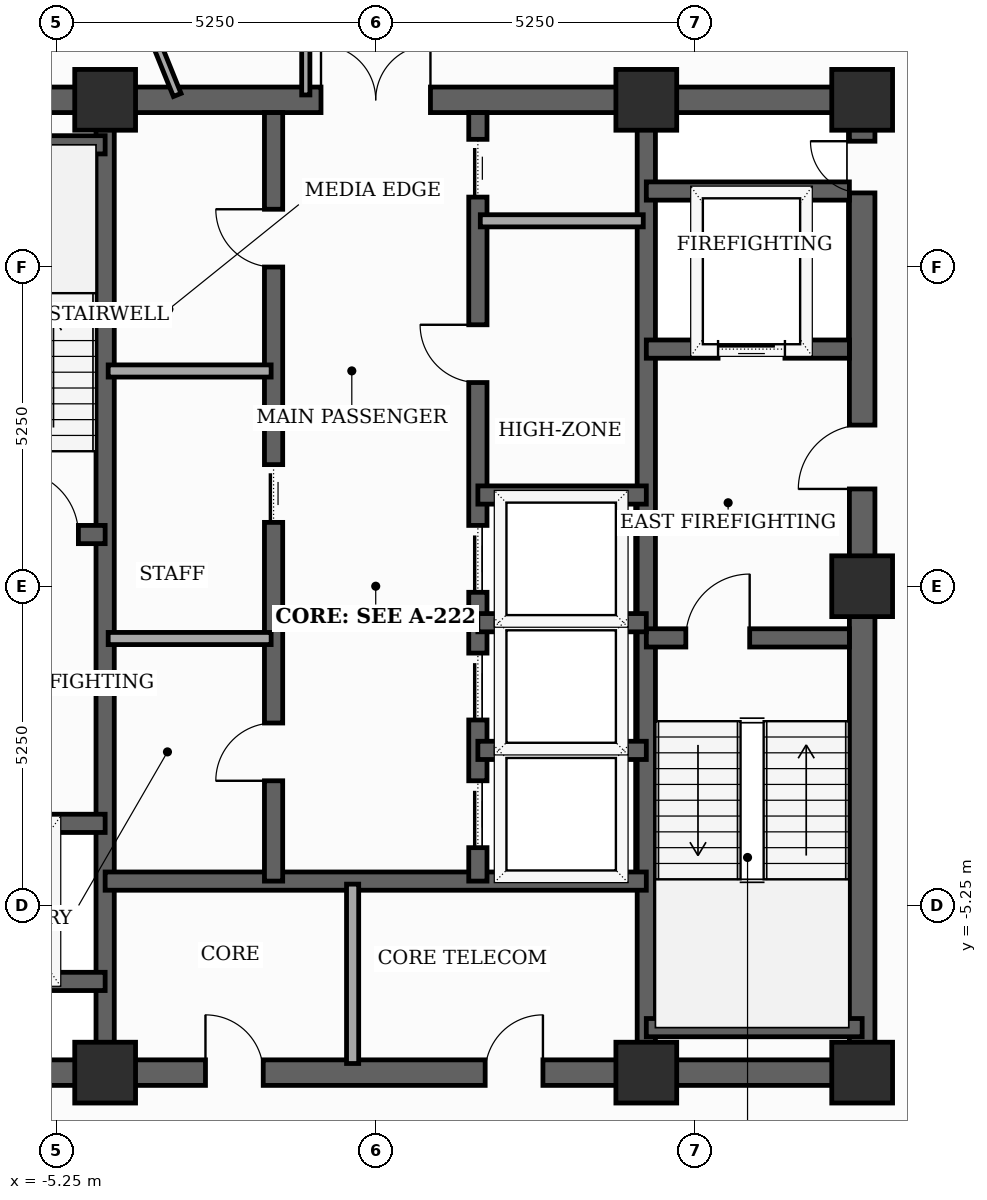
"""IFC4 building model, lengths in metres.
Left out: names, types, materials, properties, quantities, classifications, styles, units other than length and angle.
Written with IfcOpenShell. Run it as: python <this file> out.ifc"""

import sys

from ifc_helpers import new_model, si_unit, direction, frame, frame_2d, origin, origin_2d, place, context, subcontext, project, spatial, rectangle, extrude, element, fill, save


model = new_model("IFC4")
c1 = context("Model", 3, precision=1e-05, world=origin(), true_north=direction((0.0, 1.0)))
c2 = subcontext(c1, "Body", "Model", "MODEL_VIEW")
j1 = project(units=[si_unit("LENGTHUNIT", "METRE"), si_unit("PLANEANGLEUNIT", "RADIAN")], contexts=[c1])
p1 = place(None, origin())
s1 = spatial("IfcSite", under=j1, at=p1, CompositionType="ELEMENT")
p2 = place(p1, origin())
s2 = spatial("IfcBuilding", under=s1, at=p2, CompositionType="ELEMENT")
p3 = place(p2, frame((0.0, 0.0, 259.6)))
s3 = spatial("IfcBuildingStorey", under=s2, at=p3, CompositionType="ELEMENT", Elevation=259.6)
for number, where, z_axis, x_axis in (
    (1, (-4.45, -8.0, 0.0), (0.0, 0.0, 1.0), (1.0, 0.0, 0.0)),
    (2, (4.45, -8.0, 0.0), (0.0, 0.0, 1.0), (1.0, 0.0, 0.0)),
    (3, (8.0, -8.0, 0.0), (0.0, 0.0, 1.0), (1.0, 0.0, 0.0)),
    (4, (8.0, 0.0, 0.0), (0.0, 0.0, 1.0), (1.0, 0.0, 0.0)),
    (5, (8.0, 8.0, 0.0), (0.0, 0.0, 1.0), (1.0, 0.0, 0.0)),
    (6, (4.45, 8.0, 0.0), (0.0, 0.0, 1.0), (1.0, 0.0, 0.0)),
    (7, (-4.45, 8.0, 0.0), (0.0, 0.0, 1.0), (1.0, 0.0, 0.0)),
):
    element("IfcColumn", number, at=place(p3, frame(where, z_axis=z_axis, x_axis=x_axis)), inside=s3, PredefinedType="COLUMN", context=c2, shape_type="SweptSolid", body=[
        extrude(rectangle(XDim=1.0, YDim=1.0, at=origin_2d()), origin(), (0.0, 0.0, 1.0), 3.7),
    ])
p4 = place(p3, frame((8.0, -8.0, 0.0), z_axis=(0.0, 0.0, 1.0), x_axis=(0.0, 1.0, 0.0)))
e8 = element("IfcWall", 8, at=p4, inside=s3, PredefinedType="SHEAR", context=c2, shape_type="SweptSolid", body=[
    extrude(rectangle(XDim=16.0, YDim=0.42, at=frame_2d((8.0, 0.0))), origin(), (0.0, 0.0, 1.0), 3.5),
])
p5 = place(p4, frame((9.6, 0.0, 0.0)))
e9 = element("IfcOpeningElement", 9, at=p5, cuts=e8, PredefinedType="OPENING", context=c2, shape_type="SweptSolid", body=[
    extrude(rectangle(XDim=1.05, YDim=2.15, at=frame_2d((0.525, 1.075))), frame((0.0, 0.22, 0.0), z_axis=(0.0, -1.0, 0.0), x_axis=(1.0, 0.0, 0.0)), (0.0, 0.0, 1.0), 0.44),
])
p6 = place(p4, frame((14.469, 0.0, 0.0)))
e10 = element("IfcOpeningElement", 10, at=p6, cuts=e8, PredefinedType="OPENING", context=c2, shape_type="SweptSolid", body=[
    extrude(rectangle(XDim=0.85, YDim=2.02, at=frame_2d((0.425, 1.01))), frame((0.0, 0.22, 0.0), z_axis=(0.0, -1.0, 0.0), x_axis=(1.0, 0.0, 0.0)), (0.0, 0.0, 1.0), 0.44),
])
p7 = place(p3, frame((-8.0, -8.0, 0.0), z_axis=(0.0, 0.0, 1.0), x_axis=(1.0, 0.0, 0.0)))
e11 = element("IfcWall", 11, at=p7, inside=s3, PredefinedType="SHEAR", context=c2, shape_type="SweptSolid", body=[
    extrude(rectangle(XDim=16.0, YDim=0.42, at=frame_2d((8.0, 0.0))), origin(), (0.0, 0.0, 1.0), 3.5),
])
p8 = place(p7, frame((5.2, 0.0, 0.0)))
e12 = element("IfcOpeningElement", 12, at=p8, cuts=e11, PredefinedType="OPENING", context=c2, shape_type="SweptSolid", body=[
    extrude(rectangle(XDim=0.95, YDim=2.1, at=frame_2d((0.475, 1.05))), frame((0.0, 0.22, 0.0), z_axis=(0.0, -1.0, 0.0), x_axis=(1.0, 0.0, 0.0)), (0.0, 0.0, 1.0), 0.44),
])
p9 = place(p7, frame((9.8, 0.0, 0.0)))
e13 = element("IfcOpeningElement", 13, at=p9, cuts=e11, PredefinedType="OPENING", context=c2, shape_type="SweptSolid", body=[
    extrude(rectangle(XDim=0.95, YDim=2.1, at=frame_2d((0.475, 1.05))), frame((0.0, 0.22, 0.0), z_axis=(0.0, -1.0, 0.0), x_axis=(1.0, 0.0, 0.0)), (0.0, 0.0, 1.0), 0.44),
])
p10 = place(p3, frame((-8.0, 8.0, 0.0), z_axis=(0.0, 0.0, 1.0), x_axis=(1.0, 0.0, 0.0)))
e14 = element("IfcWall", 14, at=p10, inside=s3, PredefinedType="SHEAR", context=c2, shape_type="SweptSolid", body=[
    extrude(rectangle(XDim=16.0, YDim=0.42, at=frame_2d((8.0, 0.0))), origin(), (0.0, 0.0, 1.0), 3.5),
])
p11 = place(p10, frame((7.1, 0.0, 0.0)))
e15 = element("IfcOpeningElement", 15, at=p11, cuts=e14, PredefinedType="OPENING", context=c2, shape_type="SweptSolid", body=[
    extrude(rectangle(XDim=1.8, YDim=2.15, at=frame_2d((0.9, 1.075))), frame((0.0, 0.22, 0.0), z_axis=(0.0, -1.0, 0.0), x_axis=(1.0, 0.0, 0.0)), (0.0, 0.0, 1.0), 0.44),
])
for number, where, z_axis, x_axis in (
    (16, (-4.45, -7.79, 0.0), (0.0, 0.0, 1.0), (0.0, 1.0, 0.0)),
    (17, (4.45, -7.79, 0.0), (0.0, 0.0, 1.0), (0.0, 1.0, 0.0)),
):
    element("IfcWall", number, at=place(p3, frame(where, z_axis=z_axis, x_axis=x_axis)), inside=s3, PredefinedType="SHEAR", context=c2, shape_type="SweptSolid", body=[
        extrude(rectangle(XDim=15.58, YDim=0.3, at=frame_2d((7.79, 0.0))), origin(), (0.0, 0.0, 1.0), 3.5),
    ])
p12 = place(p3, frame((-7.79, 0.85, 0.0), z_axis=(0.0, 0.0, 1.0), x_axis=(1.0, 0.0, 0.0)))
e18 = element("IfcWall", 18, at=p12, inside=s3, PredefinedType="SHEAR", context=c2, shape_type="SweptSolid", body=[
    extrude(rectangle(XDim=3.34, YDim=0.3, at=frame_2d((1.67, 0.0))), origin(), (0.0, 0.0, 1.0), 3.5),
])
p13 = place(p12, frame((1.85, 0.0, 0.0)))
e19 = element("IfcOpeningElement", 19, at=p13, cuts=e18, PredefinedType="OPENING", context=c2, shape_type="SweptSolid", body=[
    extrude(rectangle(XDim=1.05, YDim=2.15, at=frame_2d((0.525, 1.075))), frame((0.0, 0.16, 0.0), z_axis=(0.0, -1.0, 0.0), x_axis=(1.0, 0.0, 0.0)), (0.0, 0.0, 1.0), 0.32),
])
p14 = place(p3, frame((-7.79, 7.26, 0.0), z_axis=(0.0, 0.0, 1.0), x_axis=(1.0, 0.0, 0.0)))
e20 = element("IfcWall", 20, at=p14, inside=s3, PredefinedType="SHEAR", context=c2, shape_type="SweptSolid", body=[
    extrude(rectangle(XDim=3.34, YDim=0.3, at=frame_2d((1.67, 0.0))), origin(), (0.0, 0.0, 1.0), 3.5),
])
p15 = place(p3, frame((4.45, -0.85, 0.0), z_axis=(0.0, 0.0, 1.0), x_axis=(1.0, 0.0, 0.0)))
e21 = element("IfcWall", 21, at=p15, inside=s3, PredefinedType="SHEAR", context=c2, shape_type="SweptSolid", body=[
    extrude(rectangle(XDim=3.34, YDim=0.3, at=frame_2d((1.67, 0.0))), origin(), (0.0, 0.0, 1.0), 3.5),
])
p16 = place(p15, frame((0.65, 0.0, 0.0)))
e22 = element("IfcOpeningElement", 22, at=p16, cuts=e21, PredefinedType="OPENING", context=c2, shape_type="SweptSolid", body=[
    extrude(rectangle(XDim=1.05, YDim=2.15, at=frame_2d((0.525, 1.075))), frame((0.0, 0.16, 0.0), z_axis=(0.0, -1.0, 0.0), x_axis=(1.0, 0.0, 0.0)), (0.0, 0.0, 1.0), 0.32),
])
p17 = place(p3, frame((4.45, -7.26, 0.0), z_axis=(0.0, 0.0, 1.0), x_axis=(1.0, 0.0, 0.0)))
e23 = element("IfcWall", 23, at=p17, inside=s3, PredefinedType="SHEAR", context=c2, shape_type="SweptSolid", body=[
    extrude(rectangle(XDim=3.55, YDim=0.3, at=frame_2d((1.775, 0.0))), origin(), (0.0, 0.0, 1.0), 3.5),
])
p18 = place(p3, frame((-7.79, -3.9, 0.0), z_axis=(0.0, 0.0, 1.0), x_axis=(1.0, 0.0, 0.0)))
e24 = element("IfcWall", 24, at=p18, inside=s3, PredefinedType="SHEAR", context=c2, shape_type="SweptSolid", body=[
    extrude(rectangle(XDim=3.34, YDim=0.3, at=frame_2d((1.67, 0.0))), origin(), (0.0, 0.0, 1.0), 3.5),
])
p19 = place(p18, frame((1.27, 0.0, 0.0)))
e25 = element("IfcOpeningElement", 25, at=p19, cuts=e24, PredefinedType="OPENING", context=c2, shape_type="SweptSolid", body=[
    extrude(rectangle(XDim=1.1, YDim=2.1, at=frame_2d((0.55, 1.05))), frame((0.0, 0.16, 0.0), z_axis=(0.0, -1.0, 0.0), x_axis=(1.0, 0.0, 0.0)), (0.0, 0.0, 1.0), 0.32),
])
p20 = place(p3, frame((-7.79, -6.5, 0.0), z_axis=(0.0, 0.0, 1.0), x_axis=(1.0, 0.0, 0.0)))
e26 = element("IfcWall", 26, at=p20, inside=s3, PredefinedType="SHEAR", context=c2, shape_type="SweptSolid", body=[
    extrude(rectangle(XDim=3.34, YDim=0.3, at=frame_2d((1.67, 0.0))), origin(), (0.0, 0.0, 1.0), 3.5),
])
p21 = place(p3, frame((4.45, 3.9, 0.0), z_axis=(0.0, 0.0, 1.0), x_axis=(1.0, 0.0, 0.0)))
e27 = element("IfcWall", 27, at=p21, inside=s3, PredefinedType="SHEAR", context=c2, shape_type="SweptSolid", body=[
    extrude(rectangle(XDim=3.34, YDim=0.3, at=frame_2d((1.67, 0.0))), origin(), (0.0, 0.0, 1.0), 3.5),
])
p22 = place(p21, frame((1.18, 0.0, 0.0)))
e28 = element("IfcOpeningElement", 28, at=p22, cuts=e27, PredefinedType="OPENING", context=c2, shape_type="SweptSolid", body=[
    extrude(rectangle(XDim=1.1, YDim=2.1, at=frame_2d((0.55, 1.05))), frame((0.0, 0.16, 0.0), z_axis=(0.0, -1.0, 0.0), x_axis=(1.0, 0.0, 0.0)), (0.0, 0.0, 1.0), 0.32),
])
p23 = place(p3, frame((4.45, 6.5, 0.0), z_axis=(0.0, 0.0, 1.0), x_axis=(1.0, 0.0, 0.0)))
e29 = element("IfcWall", 29, at=p23, inside=s3, PredefinedType="SHEAR", context=c2, shape_type="SweptSolid", body=[
    extrude(rectangle(XDim=3.34, YDim=0.3, at=frame_2d((1.67, 0.0))), origin(), (0.0, 0.0, 1.0), 3.5),
])
p24 = place(p3, frame((-4.45, -4.85, 0.0), z_axis=(0.0, 0.0, 1.0), x_axis=(1.0, 0.0, 0.0)))
e30 = element("IfcWall", 30, at=p24, inside=s3, PredefinedType="SHEAR", context=c2, shape_type="SweptSolid", body=[
    extrude(rectangle(XDim=8.9, YDim=0.3, at=frame_2d((4.45, 0.0))), origin(), (0.0, 0.0, 1.0), 3.5),
])
p25 = place(p3, frame((-1.68, -4.85, 0.0), z_axis=(0.0, 0.0, 1.0), x_axis=(0.0, 1.0, 0.0)))
e31 = element("IfcWall", 31, at=p25, inside=s3, PredefinedType="SHEAR", context=c2, shape_type="SweptSolid", body=[
    extrude(rectangle(XDim=12.64, YDim=0.3, at=frame_2d((6.32, 0.0))), origin(), (0.0, 0.0, 1.0), 3.5),
])
p26 = place(p25, frame((1.65, 0.0, 0.0)))
e32 = element("IfcOpeningElement", 32, at=p26, cuts=e31, PredefinedType="OPENING", context=c2, shape_type="SweptSolid", body=[
    extrude(rectangle(XDim=0.95, YDim=2.1, at=frame_2d((0.475, 1.05))), frame((0.0, 0.16, 0.0), z_axis=(0.0, -1.0, 0.0), x_axis=(1.0, 0.0, 0.0)), (0.0, 0.0, 1.0), 0.32),
])
p27 = place(p25, frame((5.9, 0.0, 0.0)))
e33 = element("IfcOpeningElement", 33, at=p27, cuts=e31, PredefinedType="OPENING", context=c2, shape_type="SweptSolid", body=[
    extrude(rectangle(XDim=0.95, YDim=2.1, at=frame_2d((0.475, 1.05))), frame((0.0, 0.16, 0.0), z_axis=(0.0, -1.0, 0.0), x_axis=(1.0, 0.0, 0.0)), (0.0, 0.0, 1.0), 0.32),
])
p28 = place(p25, frame((10.1, 0.0, 0.0)))
e34 = element("IfcOpeningElement", 34, at=p28, cuts=e31, PredefinedType="OPENING", context=c2, shape_type="SweptSolid", body=[
    extrude(rectangle(XDim=0.95, YDim=2.1, at=frame_2d((0.475, 1.05))), frame((0.0, 0.16, 0.0), z_axis=(0.0, -1.0, 0.0), x_axis=(1.0, 0.0, 0.0)), (0.0, 0.0, 1.0), 0.32),
])
p29 = place(p3, frame((1.68, -4.85, 0.0), z_axis=(0.0, 0.0, 1.0), x_axis=(0.0, 1.0, 0.0)))
e35 = element("IfcWall", 35, at=p29, inside=s3, PredefinedType="SHEAR", context=c2, shape_type="SweptSolid", body=[
    extrude(rectangle(XDim=12.64, YDim=0.3, at=frame_2d((6.32, 0.0))), origin(), (0.0, 0.0, 1.0), 3.5),
])
p30 = place(p29, frame((0.55, 0.0, 0.0)))
e36 = element("IfcOpeningElement", 36, at=p30, cuts=e35, PredefinedType="OPENING", context=c2, shape_type="SweptSolid", body=[
    extrude(rectangle(XDim=1.1, YDim=2.1, at=frame_2d((0.55, 1.05))), frame((0.0, 0.16, 0.0), z_axis=(0.0, -1.0, 0.0), x_axis=(1.0, 0.0, 0.0)), (0.0, 0.0, 1.0), 0.32),
])
p31 = place(p29, frame((2.65, 0.0, 0.0)))
e37 = element("IfcOpeningElement", 37, at=p31, cuts=e35, PredefinedType="OPENING", context=c2, shape_type="SweptSolid", body=[
    extrude(rectangle(XDim=1.1, YDim=2.1, at=frame_2d((0.55, 1.05))), frame((0.0, 0.16, 0.0), z_axis=(0.0, -1.0, 0.0), x_axis=(1.0, 0.0, 0.0)), (0.0, 0.0, 1.0), 0.32),
])
p32 = place(p29, frame((4.75, 0.0, 0.0)))
e38 = element("IfcOpeningElement", 38, at=p32, cuts=e35, PredefinedType="OPENING", context=c2, shape_type="SweptSolid", body=[
    extrude(rectangle(XDim=1.1, YDim=2.1, at=frame_2d((0.55, 1.05))), frame((0.0, 0.16, 0.0), z_axis=(0.0, -1.0, 0.0), x_axis=(1.0, 0.0, 0.0)), (0.0, 0.0, 1.0), 0.32),
])
p33 = place(p29, frame((8.2, 0.0, 0.0)))
e39 = element("IfcOpeningElement", 39, at=p33, cuts=e35, PredefinedType="OPENING", context=c2, shape_type="SweptSolid", body=[
    extrude(rectangle(XDim=0.95, YDim=2.1, at=frame_2d((0.475, 1.05))), frame((0.0, 0.16, 0.0), z_axis=(0.0, -1.0, 0.0), x_axis=(1.0, 0.0, 0.0)), (0.0, 0.0, 1.0), 0.32),
])
p34 = place(p29, frame((11.25, 0.0, 0.0)))
e40 = element("IfcOpeningElement", 40, at=p34, cuts=e35, PredefinedType="OPENING", context=c2, shape_type="SweptSolid", body=[
    extrude(rectangle(XDim=0.95, YDim=2.1, at=frame_2d((0.475, 1.05))), frame((0.0, 0.16, 0.0), z_axis=(0.0, -1.0, 0.0), x_axis=(1.0, 0.0, 0.0)), (0.0, 0.0, 1.0), 0.32),
])
for number, where, z_axis, x_axis in (
    (41, (1.68, 1.5, 0.0), (0.0, 0.0, 1.0), (1.0, 0.0, 0.0)),
    (42, (1.68, -2.7, 0.0), (0.0, 0.0, 1.0), (1.0, 0.0, 0.0)),
    (43, (1.68, -0.6, 0.0), (0.0, 0.0, 1.0), (1.0, 0.0, 0.0)),
):
    element("IfcWall", number, at=place(p3, frame(where, z_axis=z_axis, x_axis=x_axis)), inside=s3, PredefinedType="SHEAR", context=c2, shape_type="SweptSolid", body=[
        extrude(rectangle(XDim=2.77, YDim=0.3, at=frame_2d((1.385, 0.0))), origin(), (0.0, 0.0, 1.0), 3.5),
    ])
p35 = place(p3, frame((-0.38, -7.85, 0.0), z_axis=(0.0, 0.0, 1.0), x_axis=(0.0, 1.0, 0.0)))
e44 = element("IfcWall", 44, at=p35, inside=s3, PredefinedType="SOLIDWALL", context=c2, shape_type="SweptSolid", body=[
    extrude(rectangle(XDim=2.95, YDim=0.2, at=frame_2d((1.475, 0.0))), origin(), (0.0, 0.0, 1.0), 2.885),
])
for number, where, z_axis, x_axis in (
    (45, (-4.4, -0.86, 0.0), (0.0, 0.0, 1.0), (1.0, 0.0, 0.0)),
    (46, (-4.4, 3.54, 0.0), (0.0, 0.0, 1.0), (1.0, 0.0, 0.0)),
    (47, (1.72, 6.01, 0.0), (0.0, 0.0, 1.0), (1.0, 0.0, 0.0)),
):
    element("IfcWall", number, at=place(p3, frame(where, z_axis=z_axis, x_axis=x_axis)), inside=s3, PredefinedType="SOLIDWALL", context=c2, shape_type="SweptSolid", body=[
        extrude(rectangle(XDim=2.68, YDim=0.2, at=frame_2d((1.34, 0.0))), origin(), (0.0, 0.0, 1.0), 3.5),
    ])
p36 = place(p3, frame((-1.15, 10.65, 0.0), z_axis=(0.0, 0.0, 1.0), x_axis=(0.0, -1.0, 0.0)))
e48 = element("IfcWall", 48, at=p36, inside=s3, PredefinedType="PARTITIONING", context=c2, shape_type="SweptSolid", body=[
    extrude(rectangle(XDim=2.57, YDim=0.135, at=frame_2d((1.285, 0.0))), origin(), (0.0, 0.0, 1.0), 2.885),
])
p37 = place(p3, frame((-5.896, 14.593, 0.0), z_axis=(0.0, 0.0, 1.0), x_axis=(0.374630268076, -0.927174289032, 0.0)))
e49 = element("IfcWall", 49, at=p37, inside=s3, PredefinedType="PARTITIONING", context=c2, shape_type="SweptSolid", body=[
    extrude(rectangle(XDim=7.024, YDim=0.135, at=frame_2d((3.512, 0.0))), origin(), (0.0, 0.0, 1.0), 2.885),
])
p38 = place(p37, frame((3.5, 0.0, 0.0)))
e50 = element("IfcOpeningElement", 50, at=p38, cuts=e49, PredefinedType="OPENING", context=c2, shape_type="SweptSolid", body=[
    extrude(rectangle(XDim=0.92, YDim=2.1, at=frame_2d((0.46, 1.05))), frame((0.0, 0.077, 0.0), z_axis=(0.0, -1.0, 0.0), x_axis=(1.0, 0.0, 0.0)), (0.0, 0.0, 1.0), 0.155),
])
p39 = place(p5, origin())
e51 = element("IfcDoor", 51, at=p39, inside=s3, OperationType="SINGLE_SWING_LEFT", PredefinedType="DOOR", context=c2, shape_type="SweptSolid", body=[
    extrude(rectangle(XDim=1.05, YDim=2.15, at=frame_2d((0.525, 1.075))), frame((0.0, 0.025, 0.0), z_axis=(0.0, -1.0, 0.0), x_axis=(1.0, 0.0, 0.0)), (0.0, 0.0, 1.0), 0.05),
])
fill(e9, e51)
p40 = place(p6, origin())
e52 = element("IfcDoor", 52, at=p40, inside=s3, OperationType="SINGLE_SWING_RIGHT", PredefinedType="TRAPDOOR", context=c2, shape_type="SweptSolid", body=[
    extrude(rectangle(XDim=0.85, YDim=2.02, at=frame_2d((0.425, 1.01))), frame((0.0, 0.025, 0.0), z_axis=(0.0, -1.0, 0.0), x_axis=(1.0, 0.0, 0.0)), (0.0, 0.0, 1.0), 0.05),
])
fill(e10, e52)
p41 = place(p8, origin())
e53 = element("IfcDoor", 53, at=p41, inside=s3, OperationType="SINGLE_SWING_LEFT", PredefinedType="DOOR", context=c2, shape_type="SweptSolid", body=[
    extrude(rectangle(XDim=0.95, YDim=2.1, at=frame_2d((0.475, 1.05))), frame((0.0, 0.025, 0.0), z_axis=(0.0, -1.0, 0.0), x_axis=(1.0, 0.0, 0.0)), (0.0, 0.0, 1.0), 0.05),
])
fill(e12, e53)
p42 = place(p9, origin())
e54 = element("IfcDoor", 54, at=p42, inside=s3, OperationType="SINGLE_SWING_RIGHT", PredefinedType="DOOR", context=c2, shape_type="SweptSolid", body=[
    extrude(rectangle(XDim=0.95, YDim=2.1, at=frame_2d((0.475, 1.05))), frame((0.0, 0.025, 0.0), z_axis=(0.0, -1.0, 0.0), x_axis=(1.0, 0.0, 0.0)), (0.0, 0.0, 1.0), 0.05),
])
fill(e13, e54)
p43 = place(p11, origin())
e55 = element("IfcDoor", 55, at=p43, inside=s3, OperationType="DOUBLE_DOOR_SINGLE_SWING", PredefinedType="DOOR", context=c2, shape_type="SweptSolid", body=[
    extrude(rectangle(XDim=1.8, YDim=2.15, at=frame_2d((0.9, 1.075))), frame((0.0, 0.025, 0.0), z_axis=(0.0, -1.0, 0.0), x_axis=(1.0, 0.0, 0.0)), (0.0, 0.0, 1.0), 0.05),
])
fill(e15, e55)
p44 = place(p13, origin())
e56 = element("IfcDoor", 56, at=p44, inside=s3, OperationType="SINGLE_SWING_LEFT", PredefinedType="DOOR", context=c2, shape_type="SweptSolid", body=[
    extrude(rectangle(XDim=1.05, YDim=2.15, at=frame_2d((0.525, 1.075))), frame((0.0, 0.025, 0.0), z_axis=(0.0, -1.0, 0.0), x_axis=(1.0, 0.0, 0.0)), (0.0, 0.0, 1.0), 0.05),
])
fill(e19, e56)
p45 = place(p16, origin())
e57 = element("IfcDoor", 57, at=p45, inside=s3, OperationType="SINGLE_SWING_RIGHT", PredefinedType="DOOR", context=c2, shape_type="SweptSolid", body=[
    extrude(rectangle(XDim=1.05, YDim=2.15, at=frame_2d((0.525, 1.075))), frame((0.0, 0.025, 0.0), z_axis=(0.0, -1.0, 0.0), x_axis=(1.0, 0.0, 0.0)), (0.0, 0.0, 1.0), 0.05),
])
fill(e22, e57)
p46 = place(p22, origin())
e58 = element("IfcDoor", 58, at=p46, inside=s3, OperationType="SLIDING_TO_LEFT", PredefinedType="DOOR", context=c2, shape_type="SweptSolid", body=[
    extrude(rectangle(XDim=1.1, YDim=2.1, at=frame_2d((0.55, 1.05))), frame((0.0, 0.025, 0.0), z_axis=(0.0, -1.0, 0.0), x_axis=(1.0, 0.0, 0.0)), (0.0, 0.0, 1.0), 0.05),
])
fill(e28, e58)
p47 = place(p26, origin())
e59 = element("IfcDoor", 59, at=p47, inside=s3, OperationType="SINGLE_SWING_LEFT", PredefinedType="DOOR", context=c2, shape_type="SweptSolid", body=[
    extrude(rectangle(XDim=0.95, YDim=2.1, at=frame_2d((0.475, 1.05))), frame((0.0, 0.025, 0.0), z_axis=(0.0, -1.0, 0.0), x_axis=(1.0, 0.0, 0.0)), (0.0, 0.0, 1.0), 0.05),
])
fill(e32, e59)
p48 = place(p27, origin())
e60 = element("IfcDoor", 60, at=p48, inside=s3, OperationType="SLIDING_TO_LEFT", PredefinedType="DOOR", context=c2, shape_type="SweptSolid", body=[
    extrude(rectangle(XDim=0.95, YDim=2.1, at=frame_2d((0.475, 1.05))), frame((0.0, 0.025, 0.0), z_axis=(0.0, -1.0, 0.0), x_axis=(1.0, 0.0, 0.0)), (0.0, 0.0, 1.0), 0.05),
])
fill(e33, e60)
p49 = place(p28, origin())
e61 = element("IfcDoor", 61, at=p49, inside=s3, OperationType="SINGLE_SWING_RIGHT", PredefinedType="DOOR", context=c2, shape_type="SweptSolid", body=[
    extrude(rectangle(XDim=0.95, YDim=2.1, at=frame_2d((0.475, 1.05))), frame((0.0, 0.025, 0.0), z_axis=(0.0, -1.0, 0.0), x_axis=(1.0, 0.0, 0.0)), (0.0, 0.0, 1.0), 0.05),
])
fill(e34, e61)
p50 = place(p30, origin())
e62 = element("IfcDoor", 62, at=p50, inside=s3, OperationType="SLIDING_TO_LEFT", PredefinedType="DOOR", context=c2, shape_type="SweptSolid", body=[
    extrude(rectangle(XDim=1.1, YDim=2.1, at=frame_2d((0.55, 1.05))), frame((0.0, 0.025, 0.0), z_axis=(0.0, -1.0, 0.0), x_axis=(1.0, 0.0, 0.0)), (0.0, 0.0, 1.0), 0.05),
])
fill(e36, e62)
p51 = place(p31, origin())
e63 = element("IfcDoor", 63, at=p51, inside=s3, OperationType="SLIDING_TO_LEFT", PredefinedType="DOOR", context=c2, shape_type="SweptSolid", body=[
    extrude(rectangle(XDim=1.1, YDim=2.1, at=frame_2d((0.55, 1.05))), frame((0.0, 0.025, 0.0), z_axis=(0.0, -1.0, 0.0), x_axis=(1.0, 0.0, 0.0)), (0.0, 0.0, 1.0), 0.05),
])
fill(e37, e63)
p52 = place(p32, origin())
e64 = element("IfcDoor", 64, at=p52, inside=s3, OperationType="SLIDING_TO_LEFT", PredefinedType="DOOR", context=c2, shape_type="SweptSolid", body=[
    extrude(rectangle(XDim=1.1, YDim=2.1, at=frame_2d((0.55, 1.05))), frame((0.0, 0.025, 0.0), z_axis=(0.0, -1.0, 0.0), x_axis=(1.0, 0.0, 0.0)), (0.0, 0.0, 1.0), 0.05),
])
fill(e38, e64)
p53 = place(p33, origin())
e65 = element("IfcDoor", 65, at=p53, inside=s3, OperationType="SINGLE_SWING_RIGHT", PredefinedType="DOOR", context=c2, shape_type="SweptSolid", body=[
    extrude(rectangle(XDim=0.95, YDim=2.1, at=frame_2d((0.475, 1.05))), frame((0.0, 0.025, 0.0), z_axis=(0.0, -1.0, 0.0), x_axis=(1.0, 0.0, 0.0)), (0.0, 0.0, 1.0), 0.05),
])
fill(e39, e65)
p54 = place(p34, origin())
e66 = element("IfcDoor", 66, at=p54, inside=s3, OperationType="SLIDING_TO_LEFT", PredefinedType="DOOR", context=c2, shape_type="SweptSolid", body=[
    extrude(rectangle(XDim=0.95, YDim=2.1, at=frame_2d((0.475, 1.05))), frame((0.0, 0.025, 0.0), z_axis=(0.0, -1.0, 0.0), x_axis=(1.0, 0.0, 0.0)), (0.0, 0.0, 1.0), 0.05),
])
fill(e40, e66)
save(model, sys.argv[1])
